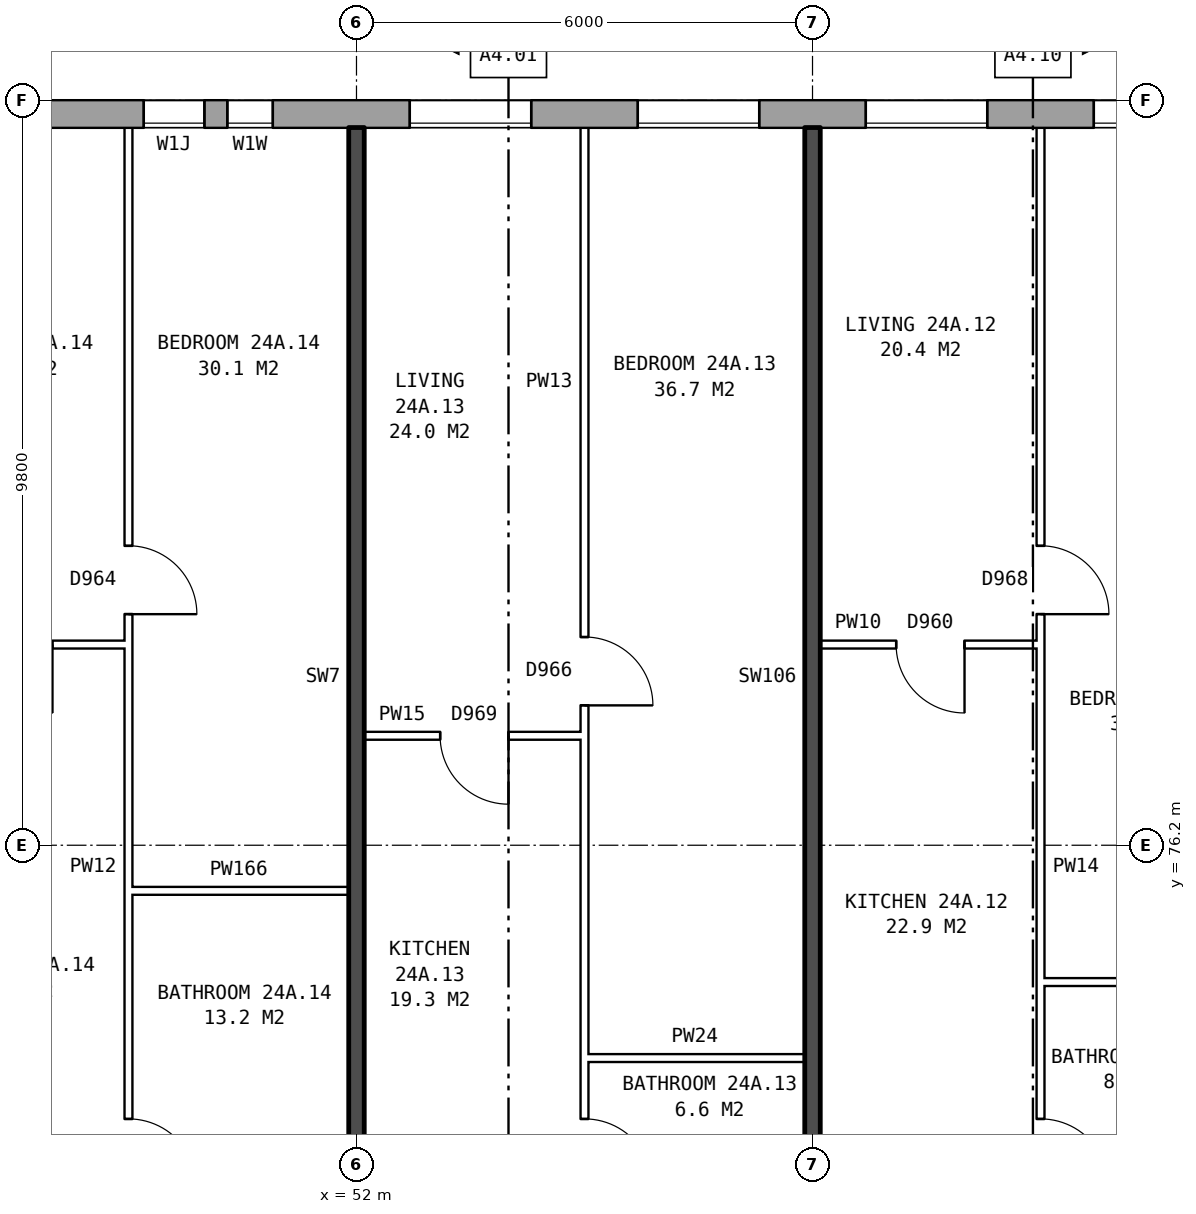
"""IFC4 building model, lengths in metres.
Left out: names, types, materials, properties, quantities, classifications, styles, units other than length and angle.
Written with IfcOpenShell. Run it as: python <this file> out.ifc"""

import sys

from ifc_helpers import new_model, si_unit, direction, frame, frame_2d, origin, place, context, subcontext, project, spatial, rectangle, extrude, element, fill, save


model = new_model("IFC4")
c1 = context("Model", 3, precision=1e-05, world=origin(), true_north=direction((0.0, 1.0)))
c2 = subcontext(c1, "Body", "Model", "MODEL_VIEW")
j1 = project(units=[si_unit("LENGTHUNIT", "METRE"), si_unit("PLANEANGLEUNIT", "RADIAN")], contexts=[c1])
p1 = place(None, origin())
s1 = spatial("IfcSite", under=j1, at=p1, CompositionType="ELEMENT")
p2 = place(p1, origin())
s2 = spatial("IfcBuilding", under=s1, at=p2, CompositionType="ELEMENT")
p3 = place(p2, frame((0.0, 0.0, 87.1)))
s3 = spatial("IfcBuildingStorey", under=s2, at=p3, CompositionType="ELEMENT", Elevation=87.1)
p4 = place(p3, frame((72.925, 85.82, 0.0), z_axis=(0.0, 0.0, 1.0), x_axis=(-1.0, 0.0, 0.0)))
e1 = element("IfcWall", 1, at=p4, inside=s3, PredefinedType="STANDARD", context=c2, shape_type="SweptSolid", body=[
    extrude(rectangle(XDim=46.601, YDim=0.36, at=frame_2d((23.3, 0.0))), origin(), (0.0, 0.0, 1.0), 2.85),
])
p5 = place(p4, frame((0.625, 0.0, 0.8)))
e2 = element("IfcOpeningElement", 2, at=p5, cuts=e1, PredefinedType="OPENING", context=c2, shape_type="SweptSolid", body=[
    extrude(rectangle(XDim=1.6, YDim=1.8, at=frame_2d((0.8, 0.9))), frame((0.0, 0.19, 0.0), z_axis=(0.0, -1.0, 0.0), x_axis=(1.0, 0.0, 0.0)), (0.0, 0.0, 1.0), 0.38),
])
p6 = place(p4, frame((3.625, 0.0, 0.8)))
e3 = element("IfcOpeningElement", 3, at=p6, cuts=e1, PredefinedType="OPENING", context=c2, shape_type="SweptSolid", body=[
    extrude(rectangle(XDim=1.6, YDim=1.8, at=frame_2d((0.8, 0.9))), frame((0.0, 0.19, 0.0), z_axis=(0.0, -1.0, 0.0), x_axis=(1.0, 0.0, 0.0)), (0.0, 0.0, 1.0), 0.38),
])
p7 = place(p4, frame((6.625, 0.0, 0.8)))
e4 = element("IfcOpeningElement", 4, at=p7, cuts=e1, PredefinedType="OPENING", context=c2, shape_type="SweptSolid", body=[
    extrude(rectangle(XDim=1.6, YDim=1.8, at=frame_2d((0.8, 0.9))), frame((0.0, 0.19, 0.0), z_axis=(0.0, -1.0, 0.0), x_axis=(1.0, 0.0, 0.0)), (0.0, 0.0, 1.0), 0.38),
])
p8 = place(p4, frame((9.625, 0.0, 0.8)))
e5 = element("IfcOpeningElement", 5, at=p8, cuts=e1, PredefinedType="OPENING", context=c2, shape_type="SweptSolid", body=[
    extrude(rectangle(XDim=1.6, YDim=1.8, at=frame_2d((0.8, 0.9))), frame((0.0, 0.19, 0.0), z_axis=(0.0, -1.0, 0.0), x_axis=(1.0, 0.0, 0.0)), (0.0, 0.0, 1.0), 0.38),
])
p9 = place(p4, frame((12.625, 0.0, 0.8)))
e6 = element("IfcOpeningElement", 6, at=p9, cuts=e1, PredefinedType="OPENING", context=c2, shape_type="SweptSolid", body=[
    extrude(rectangle(XDim=1.6, YDim=1.8, at=frame_2d((0.8, 0.9))), frame((0.0, 0.19, 0.0), z_axis=(0.0, -1.0, 0.0), x_axis=(1.0, 0.0, 0.0)), (0.0, 0.0, 1.0), 0.38),
])
p10 = place(p4, frame((15.625, 0.0, 0.8)))
e7 = element("IfcOpeningElement", 7, at=p10, cuts=e1, PredefinedType="OPENING", context=c2, shape_type="SweptSolid", body=[
    extrude(rectangle(XDim=1.6, YDim=1.8, at=frame_2d((0.8, 0.9))), frame((0.0, 0.19, 0.0), z_axis=(0.0, -1.0, 0.0), x_axis=(1.0, 0.0, 0.0)), (0.0, 0.0, 1.0), 0.38),
])
p11 = place(p4, frame((18.625, 0.0, 0.8)))
e8 = element("IfcOpeningElement", 8, at=p11, cuts=e1, PredefinedType="OPENING", context=c2, shape_type="SweptSolid", body=[
    extrude(rectangle(XDim=1.6, YDim=1.8, at=frame_2d((0.8, 0.9))), frame((0.0, 0.19, 0.0), z_axis=(0.0, -1.0, 0.0), x_axis=(1.0, 0.0, 0.0)), (0.0, 0.0, 1.0), 0.38),
])
p12 = place(p4, frame((22.025, 0.0, 0.15)))
e9 = element("IfcOpeningElement", 9, at=p12, cuts=e1, PredefinedType="OPENING", context=c2, shape_type="SweptSolid", body=[
    extrude(rectangle(XDim=0.6, YDim=0.9, at=frame_2d((0.3, 0.45))), frame((0.0, 0.19, 0.0), z_axis=(0.0, -1.0, 0.0), x_axis=(1.0, 0.0, 0.0)), (0.0, 0.0, 1.0), 0.38),
])
p13 = place(p4, frame((25.475, 0.0, 1.4)))
e10 = element("IfcOpeningElement", 10, at=p13, cuts=e1, PredefinedType="OPENING", context=c2, shape_type="SweptSolid", body=[
    extrude(rectangle(XDim=1.2, YDim=1.2, at=frame_2d((0.6, 0.6))), frame((0.0, 0.19, 0.0), z_axis=(0.0, -1.0, 0.0), x_axis=(1.0, 0.0, 0.0)), (0.0, 0.0, 1.0), 0.38),
])
p14 = place(p4, frame((27.625, 0.0, 0.8)))
e11 = element("IfcOpeningElement", 11, at=p14, cuts=e1, PredefinedType="OPENING", context=c2, shape_type="SweptSolid", body=[
    extrude(rectangle(XDim=1.6, YDim=1.8, at=frame_2d((0.8, 0.9))), frame((0.0, 0.19, 0.0), z_axis=(0.0, -1.0, 0.0), x_axis=(1.0, 0.0, 0.0)), (0.0, 0.0, 1.0), 0.38),
])
p15 = place(p4, frame((30.625, 0.0, 0.8)))
e12 = element("IfcOpeningElement", 12, at=p15, cuts=e1, PredefinedType="OPENING", context=c2, shape_type="SweptSolid", body=[
    extrude(rectangle(XDim=1.6, YDim=1.8, at=frame_2d((0.8, 0.9))), frame((0.0, 0.19, 0.0), z_axis=(0.0, -1.0, 0.0), x_axis=(1.0, 0.0, 0.0)), (0.0, 0.0, 1.0), 0.38),
])
p16 = place(p4, frame((33.625, 0.0, 0.8)))
e13 = element("IfcOpeningElement", 13, at=p16, cuts=e1, PredefinedType="OPENING", context=c2, shape_type="SweptSolid", body=[
    extrude(rectangle(XDim=1.6, YDim=1.8, at=frame_2d((0.8, 0.9))), frame((0.0, 0.19, 0.0), z_axis=(0.0, -1.0, 0.0), x_axis=(1.0, 0.0, 0.0)), (0.0, 0.0, 1.0), 0.38),
])
p17 = place(p4, frame((36.625, 0.0, 0.8)))
e14 = element("IfcOpeningElement", 14, at=p17, cuts=e1, PredefinedType="OPENING", context=c2, shape_type="SweptSolid", body=[
    extrude(rectangle(XDim=1.6, YDim=1.8, at=frame_2d((0.8, 0.9))), frame((0.0, 0.19, 0.0), z_axis=(0.0, -1.0, 0.0), x_axis=(1.0, 0.0, 0.0)), (0.0, 0.0, 1.0), 0.38),
])
p18 = place(p4, frame((39.625, 0.0, 0.8)))
e15 = element("IfcOpeningElement", 15, at=p18, cuts=e1, PredefinedType="OPENING", context=c2, shape_type="SweptSolid", body=[
    extrude(rectangle(XDim=1.6, YDim=1.8, at=frame_2d((0.8, 0.9))), frame((0.0, 0.19, 0.0), z_axis=(0.0, -1.0, 0.0), x_axis=(1.0, 0.0, 0.0)), (0.0, 0.0, 1.0), 0.38),
])
p19 = place(p4, frame((42.625, 0.0, 0.8)))
e16 = element("IfcOpeningElement", 16, at=p19, cuts=e1, PredefinedType="OPENING", context=c2, shape_type="SweptSolid", body=[
    extrude(rectangle(XDim=1.6, YDim=1.8, at=frame_2d((0.8, 0.9))), frame((0.0, 0.19, 0.0), z_axis=(0.0, -1.0, 0.0), x_axis=(1.0, 0.0, 0.0)), (0.0, 0.0, 1.0), 0.38),
])
p20 = place(p4, frame((22.925, 0.0, 0.25)))
e17 = element("IfcOpeningElement", 17, at=p20, cuts=e1, PredefinedType="OPENING", context=c2, shape_type="SweptSolid", body=[
    extrude(rectangle(XDim=0.8, YDim=1.5, at=frame_2d((0.4, 0.75))), frame((0.0, 0.19, 0.0), z_axis=(0.0, -1.0, 0.0), x_axis=(1.0, 0.0, 0.0)), (0.0, 0.0, 1.0), 0.38),
])
p21 = place(p3, frame((55.0, 73.4, 0.0), z_axis=(0.0, 0.0, 1.0), x_axis=(1.0, 0.0, 0.0)))
e18 = element("IfcWall", 18, at=p21, inside=s3, PredefinedType="PARTITIONING", context=c2, shape_type="SweptSolid", body=[
    extrude(rectangle(XDim=2.9, YDim=0.1, at=frame_2d((1.45, 0.0))), origin(), (0.0, 0.0, 1.0), 2.85),
])
p22 = place(p3, frame((61.0, 74.4, 0.0), z_axis=(0.0, 0.0, 1.0), x_axis=(1.0, 0.0, 0.0)))
e19 = element("IfcWall", 19, at=p22, inside=s3, PredefinedType="PARTITIONING", context=c2, shape_type="SweptSolid", body=[
    extrude(rectangle(XDim=2.64, YDim=0.1, at=frame_2d((1.32, 0.0))), origin(), (0.0, 0.0, 1.0), 2.85),
])
p23 = place(p3, frame((49.0, 75.6, 0.0), z_axis=(0.0, 0.0, 1.0), x_axis=(1.0, 0.0, 0.0)))
e20 = element("IfcWall", 20, at=p23, inside=s3, PredefinedType="PARTITIONING", context=c2, shape_type="SweptSolid", body=[
    extrude(rectangle(XDim=2.9, YDim=0.1, at=frame_2d((1.45, 0.0))), origin(), (0.0, 0.0, 1.0), 2.85),
])
p24 = place(p3, frame((52.1, 77.64, 0.0), z_axis=(0.0, 0.0, 1.0), x_axis=(1.0, 0.0, 0.0)))
e21 = element("IfcWall", 21, at=p24, inside=s3, PredefinedType="PARTITIONING", context=c2, shape_type="SweptSolid", body=[
    extrude(rectangle(XDim=2.9, YDim=0.1, at=frame_2d((1.45, 0.0))), origin(), (0.0, 0.0, 1.0), 2.85),
])
p25 = place(p24, frame((1.0, 0.0, 0.0)))
e22 = element("IfcOpeningElement", 22, at=p25, cuts=e21, PredefinedType="OPENING", context=c2, shape_type="SweptSolid", body=[
    extrude(rectangle(XDim=0.9, YDim=2.1, at=frame_2d((0.45, 1.05))), frame((0.0, 0.06, 0.0), z_axis=(0.0, -1.0, 0.0), x_axis=(1.0, 0.0, 0.0)), (0.0, 0.0, 1.0), 0.12),
])
p26 = place(p3, frame((46.1, 78.84, 0.0), z_axis=(0.0, 0.0, 1.0), x_axis=(1.0, 0.0, 0.0)))
e23 = element("IfcWall", 23, at=p26, inside=s3, PredefinedType="PARTITIONING", context=c2, shape_type="SweptSolid", body=[
    extrude(rectangle(XDim=2.9, YDim=0.1, at=frame_2d((1.45, 0.0))), origin(), (0.0, 0.0, 1.0), 2.85),
])
p27 = place(p26, frame((1.0, 0.0, 0.0)))
e24 = element("IfcOpeningElement", 24, at=p27, cuts=e23, PredefinedType="OPENING", context=c2, shape_type="SweptSolid", body=[
    extrude(rectangle(XDim=0.9, YDim=2.1, at=frame_2d((0.45, 1.05))), frame((0.0, 0.06, 0.0), z_axis=(0.0, -1.0, 0.0), x_axis=(1.0, 0.0, 0.0)), (0.0, 0.0, 1.0), 0.12),
])
p28 = place(p3, frame((58.1, 78.84, 0.0), z_axis=(0.0, 0.0, 1.0), x_axis=(1.0, 0.0, 0.0)))
e25 = element("IfcWall", 25, at=p28, inside=s3, PredefinedType="PARTITIONING", context=c2, shape_type="SweptSolid", body=[
    extrude(rectangle(XDim=2.9, YDim=0.1, at=frame_2d((1.45, 0.0))), origin(), (0.0, 0.0, 1.0), 2.85),
])
p29 = place(p28, frame((1.0, 0.0, 0.0)))
e26 = element("IfcOpeningElement", 26, at=p29, cuts=e25, PredefinedType="OPENING", context=c2, shape_type="SweptSolid", body=[
    extrude(rectangle(XDim=0.9, YDim=2.1, at=frame_2d((0.45, 1.05))), frame((0.0, 0.06, 0.0), z_axis=(0.0, -1.0, 0.0), x_axis=(1.0, 0.0, 0.0)), (0.0, 0.0, 1.0), 0.12),
])
p30 = place(p3, frame((49.0, 71.3, 0.0), z_axis=(0.0, 0.0, 1.0), x_axis=(0.0, 1.0, 0.0)))
e27 = element("IfcWall", 27, at=p30, inside=s3, PredefinedType="PARTITIONING", context=c2, shape_type="SweptSolid", body=[
    extrude(rectangle(XDim=14.34, YDim=0.1, at=frame_2d((7.17, 0.0))), origin(), (0.0, 0.0, 1.0), 2.85),
])
p31 = place(p30, frame((7.94, 0.0, 0.0)))
e28 = element("IfcOpeningElement", 28, at=p31, cuts=e27, PredefinedType="OPENING", context=c2, shape_type="SweptSolid", body=[
    extrude(rectangle(XDim=0.9, YDim=2.1, at=frame_2d((0.45, 1.05))), frame((0.0, 0.06, 0.0), z_axis=(0.0, -1.0, 0.0), x_axis=(1.0, 0.0, 0.0)), (0.0, 0.0, 1.0), 0.12),
])
p32 = place(p30, frame((0.4, 0.0, 0.0)))
e29 = element("IfcOpeningElement", 29, at=p32, cuts=e27, PredefinedType="OPENING", context=c2, shape_type="SweptSolid", body=[
    extrude(rectangle(XDim=0.9, YDim=2.1, at=frame_2d((0.45, 1.05))), frame((0.0, 0.06, 0.0), z_axis=(0.0, -1.0, 0.0), x_axis=(1.0, 0.0, 0.0)), (0.0, 0.0, 1.0), 0.12),
])
p33 = place(p3, frame((52.0, 71.2, 0.0), z_axis=(0.0, 0.0, 1.0), x_axis=(0.0, 1.0, 0.0)))
e30 = element("IfcWall", 30, at=p33, inside=s3, PredefinedType="SOLIDWALL", context=c2, shape_type="SweptSolid", body=[
    extrude(rectangle(XDim=14.44, YDim=0.2, at=frame_2d((7.22, 0.0))), origin(), (0.0, 0.0, 1.0), 2.85),
])
p34 = place(p3, frame((55.0, 71.3, 0.0), z_axis=(0.0, 0.0, 1.0), x_axis=(0.0, 1.0, 0.0)))
e31 = element("IfcWall", 31, at=p34, inside=s3, PredefinedType="PARTITIONING", context=c2, shape_type="SweptSolid", body=[
    extrude(rectangle(XDim=14.34, YDim=0.1, at=frame_2d((7.17, 0.0))), origin(), (0.0, 0.0, 1.0), 2.85),
])
p35 = place(p34, frame((6.74, 0.0, 0.0)))
e32 = element("IfcOpeningElement", 32, at=p35, cuts=e31, PredefinedType="OPENING", context=c2, shape_type="SweptSolid", body=[
    extrude(rectangle(XDim=0.9, YDim=2.1, at=frame_2d((0.45, 1.05))), frame((0.0, 0.06, 0.0), z_axis=(0.0, -1.0, 0.0), x_axis=(1.0, 0.0, 0.0)), (0.0, 0.0, 1.0), 0.12),
])
p36 = place(p34, frame((0.4, 0.0, 0.0)))
e33 = element("IfcOpeningElement", 33, at=p36, cuts=e31, PredefinedType="OPENING", context=c2, shape_type="SweptSolid", body=[
    extrude(rectangle(XDim=0.9, YDim=2.1, at=frame_2d((0.45, 1.05))), frame((0.0, 0.06, 0.0), z_axis=(0.0, -1.0, 0.0), x_axis=(1.0, 0.0, 0.0)), (0.0, 0.0, 1.0), 0.12),
])
p37 = place(p3, frame((58.0, 71.2, 0.0), z_axis=(0.0, 0.0, 1.0), x_axis=(0.0, 1.0, 0.0)))
e34 = element("IfcWall", 34, at=p37, inside=s3, PredefinedType="SOLIDWALL", context=c2, shape_type="SweptSolid", body=[
    extrude(rectangle(XDim=14.44, YDim=0.2, at=frame_2d((7.22, 0.0))), origin(), (0.0, 0.0, 1.0), 2.85),
])
p38 = place(p3, frame((61.0, 71.3, 0.0), z_axis=(0.0, 0.0, 1.0), x_axis=(0.0, 1.0, 0.0)))
e35 = element("IfcWall", 35, at=p38, inside=s3, PredefinedType="PARTITIONING", context=c2, shape_type="SweptSolid", body=[
    extrude(rectangle(XDim=14.34, YDim=0.1, at=frame_2d((7.17, 0.0))), origin(), (0.0, 0.0, 1.0), 2.85),
])
p39 = place(p38, frame((7.94, 0.0, 0.0)))
e36 = element("IfcOpeningElement", 36, at=p39, cuts=e35, PredefinedType="OPENING", context=c2, shape_type="SweptSolid", body=[
    extrude(rectangle(XDim=0.9, YDim=2.1, at=frame_2d((0.45, 1.05))), frame((0.0, 0.06, 0.0), z_axis=(0.0, -1.0, 0.0), x_axis=(1.0, 0.0, 0.0)), (0.0, 0.0, 1.0), 0.12),
])
p40 = place(p38, frame((0.4, 0.0, 0.0)))
e37 = element("IfcOpeningElement", 37, at=p40, cuts=e35, PredefinedType="OPENING", context=c2, shape_type="SweptSolid", body=[
    extrude(rectangle(XDim=0.9, YDim=2.1, at=frame_2d((0.45, 1.05))), frame((0.0, 0.06, 0.0), z_axis=(0.0, -1.0, 0.0), x_axis=(1.0, 0.0, 0.0)), (0.0, 0.0, 1.0), 0.12),
])
p41 = place(p8, origin())
e38 = element("IfcWindow", 38, at=p41, inside=s3, PartitioningType="SINGLE_PANEL", PredefinedType="WINDOW", context=c2, shape_type="SweptSolid", body=[
    extrude(rectangle(XDim=1.6, YDim=1.8, at=frame_2d((0.8, 0.9))), frame((0.0, 0.15, 0.0), z_axis=(0.0, -1.0, 0.0), x_axis=(1.0, 0.0, 0.0)), (0.0, 0.0, 1.0), 0.06),
])
fill(e5, e38)
p42 = place(p9, origin())
e39 = element("IfcWindow", 39, at=p42, inside=s3, PartitioningType="SINGLE_PANEL", PredefinedType="WINDOW", context=c2, shape_type="SweptSolid", body=[
    extrude(rectangle(XDim=1.6, YDim=1.8, at=frame_2d((0.8, 0.9))), frame((0.0, 0.15, 0.0), z_axis=(0.0, -1.0, 0.0), x_axis=(1.0, 0.0, 0.0)), (0.0, 0.0, 1.0), 0.06),
])
fill(e6, e39)
p43 = place(p10, origin())
e40 = element("IfcWindow", 40, at=p43, inside=s3, PartitioningType="SINGLE_PANEL", PredefinedType="WINDOW", context=c2, shape_type="SweptSolid", body=[
    extrude(rectangle(XDim=1.6, YDim=1.8, at=frame_2d((0.8, 0.9))), frame((0.0, 0.15, 0.0), z_axis=(0.0, -1.0, 0.0), x_axis=(1.0, 0.0, 0.0)), (0.0, 0.0, 1.0), 0.06),
])
fill(e7, e40)
p44 = place(p11, origin())
e41 = element("IfcWindow", 41, at=p44, inside=s3, PartitioningType="SINGLE_PANEL", PredefinedType="WINDOW", context=c2, shape_type="SweptSolid", body=[
    extrude(rectangle(XDim=1.6, YDim=1.8, at=frame_2d((0.8, 0.9))), frame((0.0, 0.15, 0.0), z_axis=(0.0, -1.0, 0.0), x_axis=(1.0, 0.0, 0.0)), (0.0, 0.0, 1.0), 0.06),
])
fill(e8, e41)
p45 = place(p12, origin())
e42 = element("IfcWindow", 42, at=p45, inside=s3, PartitioningType="SINGLE_PANEL", PredefinedType="WINDOW", context=c2, shape_type="SweptSolid", body=[
    extrude(rectangle(XDim=0.6, YDim=0.9, at=frame_2d((0.3, 0.45))), frame((0.0, 0.15, 0.0), z_axis=(0.0, -1.0, 0.0), x_axis=(1.0, 0.0, 0.0)), (0.0, 0.0, 1.0), 0.06),
])
fill(e9, e42)
p46 = place(p39, frame((0.9, 0.0, 0.0), z_axis=(0.0, 0.0, 1.0), x_axis=(-1.0, 0.0, 0.0)))
e43 = element("IfcDoor", 43, at=p46, inside=s3, OperationType="SINGLE_SWING_RIGHT", PredefinedType="DOOR", context=c2, shape_type="SweptSolid", body=[
    extrude(rectangle(XDim=0.9, YDim=2.1, at=frame_2d((0.45, 1.05))), frame((0.0, 0.025, 0.0), z_axis=(0.0, -1.0, 0.0), x_axis=(1.0, 0.0, 0.0)), (0.0, 0.0, 1.0), 0.05),
])
fill(e36, e43)
p47 = place(p29, frame((0.9, 0.0, 0.0), z_axis=(0.0, 0.0, 1.0), x_axis=(-1.0, 0.0, 0.0)))
e44 = element("IfcDoor", 44, at=p47, inside=s3, OperationType="SINGLE_SWING_LEFT", PredefinedType="DOOR", context=c2, shape_type="SweptSolid", body=[
    extrude(rectangle(XDim=0.9, YDim=2.1, at=frame_2d((0.45, 1.05))), frame((0.0, 0.025, 0.0), z_axis=(0.0, -1.0, 0.0), x_axis=(1.0, 0.0, 0.0)), (0.0, 0.0, 1.0), 0.05),
])
fill(e26, e44)
p48 = place(p40, frame((0.9, 0.0, 0.0), z_axis=(0.0, 0.0, 1.0), x_axis=(-1.0, 0.0, 0.0)))
e45 = element("IfcDoor", 45, at=p48, inside=s3, OperationType="SINGLE_SWING_RIGHT", PredefinedType="DOOR", context=c2, shape_type="SweptSolid", body=[
    extrude(rectangle(XDim=0.9, YDim=2.1, at=frame_2d((0.45, 1.05))), frame((0.0, 0.025, 0.0), z_axis=(0.0, -1.0, 0.0), x_axis=(1.0, 0.0, 0.0)), (0.0, 0.0, 1.0), 0.05),
])
fill(e37, e45)
p49 = place(p35, frame((0.9, 0.0, 0.0), z_axis=(0.0, 0.0, 1.0), x_axis=(-1.0, 0.0, 0.0)))
e46 = element("IfcDoor", 46, at=p49, inside=s3, OperationType="SINGLE_SWING_RIGHT", PredefinedType="DOOR", context=c2, shape_type="SweptSolid", body=[
    extrude(rectangle(XDim=0.9, YDim=2.1, at=frame_2d((0.45, 1.05))), frame((0.0, 0.025, 0.0), z_axis=(0.0, -1.0, 0.0), x_axis=(1.0, 0.0, 0.0)), (0.0, 0.0, 1.0), 0.05),
])
fill(e32, e46)
p50 = place(p25, frame((0.9, 0.0, 0.0), z_axis=(0.0, 0.0, 1.0), x_axis=(-1.0, 0.0, 0.0)))
e47 = element("IfcDoor", 47, at=p50, inside=s3, OperationType="SINGLE_SWING_LEFT", PredefinedType="DOOR", context=c2, shape_type="SweptSolid", body=[
    extrude(rectangle(XDim=0.9, YDim=2.1, at=frame_2d((0.45, 1.05))), frame((0.0, 0.025, 0.0), z_axis=(0.0, -1.0, 0.0), x_axis=(1.0, 0.0, 0.0)), (0.0, 0.0, 1.0), 0.05),
])
fill(e22, e47)
p51 = place(p36, frame((0.9, 0.0, 0.0), z_axis=(0.0, 0.0, 1.0), x_axis=(-1.0, 0.0, 0.0)))
e48 = element("IfcDoor", 48, at=p51, inside=s3, OperationType="SINGLE_SWING_RIGHT", PredefinedType="DOOR", context=c2, shape_type="SweptSolid", body=[
    extrude(rectangle(XDim=0.9, YDim=2.1, at=frame_2d((0.45, 1.05))), frame((0.0, 0.025, 0.0), z_axis=(0.0, -1.0, 0.0), x_axis=(1.0, 0.0, 0.0)), (0.0, 0.0, 1.0), 0.05),
])
fill(e33, e48)
p52 = place(p31, frame((0.9, 0.0, 0.0), z_axis=(0.0, 0.0, 1.0), x_axis=(-1.0, 0.0, 0.0)))
e49 = element("IfcDoor", 49, at=p52, inside=s3, OperationType="SINGLE_SWING_RIGHT", PredefinedType="DOOR", context=c2, shape_type="SweptSolid", body=[
    extrude(rectangle(XDim=0.9, YDim=2.1, at=frame_2d((0.45, 1.05))), frame((0.0, 0.025, 0.0), z_axis=(0.0, -1.0, 0.0), x_axis=(1.0, 0.0, 0.0)), (0.0, 0.0, 1.0), 0.05),
])
fill(e28, e49)
p53 = place(p32, frame((0.9, 0.0, 0.0), z_axis=(0.0, 0.0, 1.0), x_axis=(-1.0, 0.0, 0.0)))
e50 = element("IfcDoor", 50, at=p53, inside=s3, OperationType="SINGLE_SWING_RIGHT", PredefinedType="DOOR", context=c2, shape_type="SweptSolid", body=[
    extrude(rectangle(XDim=0.9, YDim=2.1, at=frame_2d((0.45, 1.05))), frame((0.0, 0.025, 0.0), z_axis=(0.0, -1.0, 0.0), x_axis=(1.0, 0.0, 0.0)), (0.0, 0.0, 1.0), 0.05),
])
fill(e29, e50)
p54 = place(p20, origin())
e51 = element("IfcWindow", 51, at=p54, inside=s3, PartitioningType="SINGLE_PANEL", PredefinedType="WINDOW", context=c2, shape_type="SweptSolid", body=[
    extrude(rectangle(XDim=0.8, YDim=1.5, at=frame_2d((0.4, 0.75))), frame((0.0, 0.15, 0.0), z_axis=(0.0, -1.0, 0.0), x_axis=(1.0, 0.0, 0.0)), (0.0, 0.0, 1.0), 0.06),
])
fill(e17, e51)
save(model, sys.argv[1])
